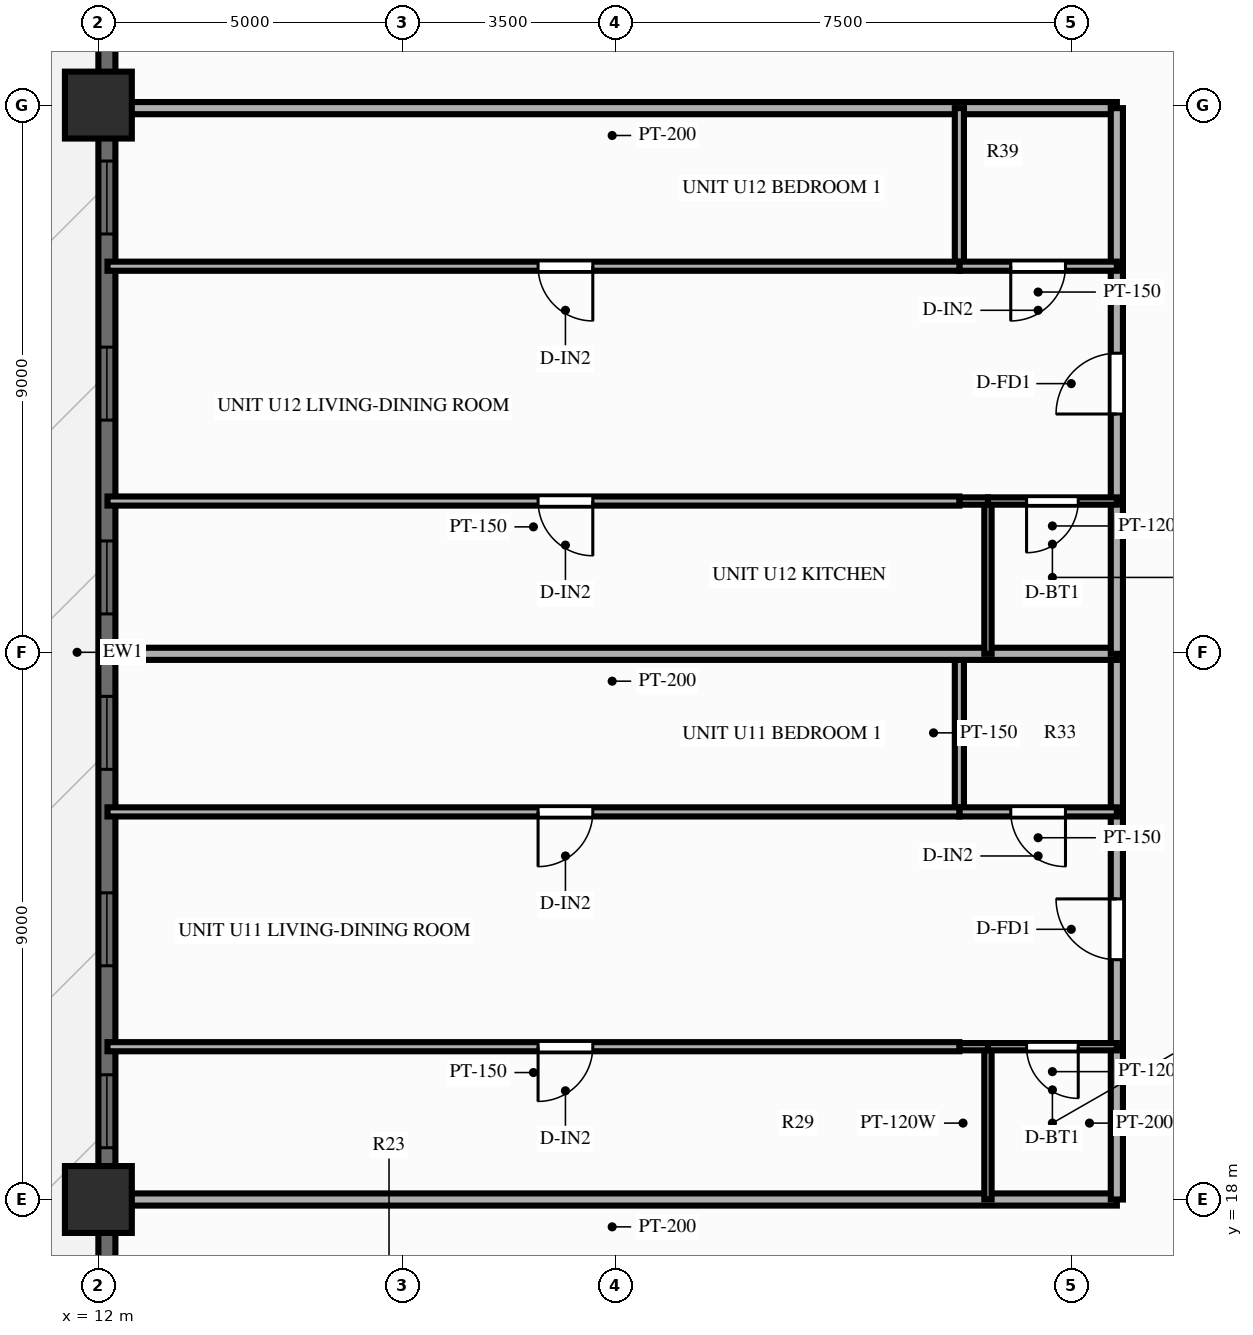
"""IFC4 building model, lengths in metres.
Left out: names, types, materials, properties, quantities, classifications, styles, units other than length and angle.
Written with IfcOpenShell. Run it as: python <this file> out.ifc"""

import sys

from ifc_helpers import new_model, si_unit, direction, frame, frame_2d, origin, origin_2d, place, context, subcontext, project, spatial, rectangle, extrude, source, transform, mapped, element, fill, save


model = new_model("IFC4")
c1 = context("Model", 3, precision=1e-05, world=origin(), true_north=direction((0.0, 1.0)))
c2 = subcontext(c1, "Body", "Model", "MODEL_VIEW")
j1 = project(units=[si_unit("LENGTHUNIT", "METRE"), si_unit("PLANEANGLEUNIT", "RADIAN")], contexts=[c1])
p1 = place(None, origin())
s1 = spatial("IfcSite", under=j1, at=p1, CompositionType="ELEMENT")
p2 = place(p1, origin())
s2 = spatial("IfcBuilding", under=s1, at=p2, CompositionType="ELEMENT")
p3 = place(p2, frame((0.0, 0.0, 22.4)))
s3 = spatial("IfcBuildingStorey", under=s2, at=p3, CompositionType="ELEMENT", Elevation=22.4)
m1 = source(origin(), c2, "Body", "SweptSolid", [
    extrude(rectangle(XDim=1.1, YDim=1.1, at=origin_2d()), origin(), (0.0, 0.0, 1.0), 3.0),
])
for number, where, z_axis, x_axis in (
    (1, (12.0, 36.0, 0.0), (0.0, 0.0, 1.0), (1.0, 0.0, 0.0)),
    (2, (12.0, 18.0, 0.0), (0.0, 0.0, 1.0), (1.0, 0.0, 0.0)),
):
    element("IfcColumn", number, at=place(p3, frame(where, z_axis=z_axis, x_axis=x_axis)), inside=s3, PredefinedType="COLUMN", context=c2, shape_type="MappedRepresentation", body=[
        mapped(m1, transform((0.0, 0.0, 0.0), scale=1.0)),
    ])
p4 = place(p3, frame((12.14, 6.5, 0.0), z_axis=(0.0, 0.0, 1.0), x_axis=(0.0, 1.0, 0.0)))
e3 = element("IfcWall", 3, at=p4, inside=s3, PredefinedType="SOLIDWALL", context=c2, shape_type="SweptSolid", body=[
    extrude(rectangle(XDim=41.0, YDim=0.28, at=frame_2d((20.5, 0.0))), origin(), (0.0, 0.0, 1.0), 2.28),
])
p5 = place(p4, frame((5.15, 0.0, 0.25)))
e4 = element("IfcOpeningElement", 4, at=p5, cuts=e3, PredefinedType="OPENING", context=c2, shape_type="SweptSolid", body=[
    extrude(rectangle(XDim=1.2, YDim=1.5, at=frame_2d((0.6, 0.75))), frame((0.0, 0.152, 0.0), z_axis=(0.0, -1.0, 0.0), x_axis=(1.0, 0.0, 0.0)), (0.0, 0.0, 1.0), 0.304),
])
p6 = place(p4, frame((12.352, 0.0, 0.25)))
e5 = element("IfcOpeningElement", 5, at=p6, cuts=e3, PredefinedType="OPENING", context=c2, shape_type="SweptSolid", body=[
    extrude(rectangle(XDim=1.2, YDim=1.5, at=frame_2d((0.6, 0.75))), frame((0.0, 0.152, 0.0), z_axis=(0.0, -1.0, 0.0), x_axis=(1.0, 0.0, 0.0)), (0.0, 0.0, 1.0), 0.304),
])
p7 = place(p4, frame((15.344, 0.0, 0.25)))
e6 = element("IfcOpeningElement", 6, at=p7, cuts=e3, PredefinedType="OPENING", context=c2, shape_type="SweptSolid", body=[
    extrude(rectangle(XDim=1.2, YDim=1.5, at=frame_2d((0.6, 0.75))), frame((0.0, 0.152, 0.0), z_axis=(0.0, -1.0, 0.0), x_axis=(1.0, 0.0, 0.0)), (0.0, 0.0, 1.0), 0.304),
])
p8 = place(p4, frame((18.575, 0.0, 0.25)))
e7 = element("IfcOpeningElement", 7, at=p8, cuts=e3, PredefinedType="OPENING", context=c2, shape_type="SweptSolid", body=[
    extrude(rectangle(XDim=1.2, YDim=1.5, at=frame_2d((0.6, 0.75))), frame((0.0, 0.152, 0.0), z_axis=(0.0, -1.0, 0.0), x_axis=(1.0, 0.0, 0.0)), (0.0, 0.0, 1.0), 0.304),
])
p9 = place(p4, frame((21.132, 0.0, 0.25)))
e8 = element("IfcOpeningElement", 8, at=p9, cuts=e3, PredefinedType="OPENING", context=c2, shape_type="SweptSolid", body=[
    extrude(rectangle(XDim=1.2, YDim=1.5, at=frame_2d((0.6, 0.75))), frame((0.0, 0.152, 0.0), z_axis=(0.0, -1.0, 0.0), x_axis=(1.0, 0.0, 0.0)), (0.0, 0.0, 1.0), 0.304),
])
p10 = place(p4, frame((24.319, 0.0, 0.25)))
e9 = element("IfcOpeningElement", 9, at=p10, cuts=e3, PredefinedType="OPENING", context=c2, shape_type="SweptSolid", body=[
    extrude(rectangle(XDim=1.2, YDim=1.5, at=frame_2d((0.6, 0.75))), frame((0.0, 0.152, 0.0), z_axis=(0.0, -1.0, 0.0), x_axis=(1.0, 0.0, 0.0)), (0.0, 0.0, 1.0), 0.304),
])
p11 = place(p4, frame((27.38, 0.0, 0.25)))
e10 = element("IfcOpeningElement", 10, at=p11, cuts=e3, PredefinedType="OPENING", context=c2, shape_type="SweptSolid", body=[
    extrude(rectangle(XDim=1.2, YDim=1.5, at=frame_2d((0.6, 0.75))), frame((0.0, 0.152, 0.0), z_axis=(0.0, -1.0, 0.0), x_axis=(1.0, 0.0, 0.0)), (0.0, 0.0, 1.0), 0.304),
])
p12 = place(p4, frame((34.45, 0.0, 0.0)))
e11 = element("IfcOpeningElement", 11, at=p12, cuts=e3, PredefinedType="OPENING", context=c2, shape_type="SweptSolid", body=[
    extrude(rectangle(XDim=1.6, YDim=2.15, at=frame_2d((0.8, 1.075))), frame((0.0, 0.152, 0.0), z_axis=(0.0, -1.0, 0.0), x_axis=(1.0, 0.0, 0.0)), (0.0, 0.0, 1.0), 0.304),
])
for number, where, z_axis, x_axis in (
    (12, (28.75, 18.0, 0.0), (0.0, 0.0, 1.0), (-1.0, 0.0, 0.0)),
    (13, (28.75, 35.95, 0.0), (0.0, 0.0, 1.0), (-1.0, 0.0, 0.0)),
):
    element("IfcWall", number, at=place(p3, frame(where, z_axis=z_axis, x_axis=x_axis)), inside=s3, PredefinedType="PARTITIONING", context=c2, shape_type="SweptSolid", body=[
        extrude(rectangle(XDim=16.6, YDim=0.2, at=frame_2d((8.3, 0.0))), origin(), (0.0, 0.0, 1.0), 2.24),
    ])
p13 = place(p3, frame((28.75, 18.0, 0.0), z_axis=(0.0, 0.0, 1.0), x_axis=(0.0, 1.0, 0.0)))
e14 = element("IfcWall", 14, at=p13, inside=s3, PredefinedType="PARTITIONING", context=c2, shape_type="SweptSolid", body=[
    extrude(rectangle(XDim=2.513, YDim=0.2, at=frame_2d((1.256, 0.0))), origin(), (0.0, 0.0, 1.0), 2.79),
])
p14 = place(p3, frame((28.75, 20.513, 0.0), z_axis=(0.0, 0.0, 1.0), x_axis=(0.0, 1.0, 0.0)))
e15 = element("IfcWall", 15, at=p14, inside=s3, PredefinedType="PARTITIONING", context=c2, shape_type="SweptSolid", body=[
    extrude(rectangle(XDim=3.862, YDim=0.2, at=frame_2d((1.931, 0.0))), origin(), (0.0, 0.0, 1.0), 2.79),
])
p15 = place(p14, frame((1.431, 0.0, 0.0)))
e16 = element("IfcOpeningElement", 16, at=p15, cuts=e15, PredefinedType="OPENING", context=c2, shape_type="SweptSolid", body=[
    extrude(rectangle(XDim=1.0, YDim=2.15, at=frame_2d((0.5, 1.075))), frame((0.0, 0.112, 0.0), z_axis=(0.0, -1.0, 0.0), x_axis=(1.0, 0.0, 0.0)), (0.0, 0.0, 1.0), 0.224),
])
p16 = place(p3, frame((28.75, 24.375, 0.0), z_axis=(0.0, 0.0, 1.0), x_axis=(0.0, 1.0, 0.0)))
e17 = element("IfcWall", 17, at=p16, inside=s3, PredefinedType="PARTITIONING", context=c2, shape_type="SweptSolid", body=[
    extrude(rectangle(XDim=2.6, YDim=0.2, at=frame_2d((1.3, 0.0))), origin(), (0.0, 0.0, 1.0), 2.79),
])
p17 = place(p3, frame((26.63, 18.0, 0.0), z_axis=(0.0, 0.0, 1.0), x_axis=(0.0, 1.0, 0.0)))
e18 = element("IfcWall", 18, at=p17, inside=s3, PredefinedType="PARTITIONING", context=c2, shape_type="SweptSolid", body=[
    extrude(rectangle(XDim=2.513, YDim=0.12, at=frame_2d((1.256, 0.0))), origin(), (0.0, 0.0, 1.0), 2.79),
])
p18 = place(p3, frame((26.16, 24.375, 0.0), z_axis=(0.0, 0.0, 1.0), x_axis=(0.0, 1.0, 0.0)))
e19 = element("IfcWall", 19, at=p18, inside=s3, PredefinedType="PARTITIONING", context=c2, shape_type="SweptSolid", body=[
    extrude(rectangle(XDim=2.6, YDim=0.15, at=frame_2d((1.3, 0.0))), origin(), (0.0, 0.0, 1.0), 2.79),
])
p19 = place(p3, frame((28.75, 20.513, 0.0), z_axis=(0.0, 0.0, 1.0), x_axis=(-1.0, 0.0, 0.0)))
e20 = element("IfcWall", 20, at=p19, inside=s3, PredefinedType="PARTITIONING", context=c2, shape_type="SweptSolid", body=[
    extrude(rectangle(XDim=2.12, YDim=0.12, at=frame_2d((1.06, 0.0))), origin(), (0.0, 0.0, 1.0), 2.79),
])
p20 = place(p19, frame((0.635, 0.0, 0.0)))
e21 = element("IfcOpeningElement", 21, at=p20, cuts=e20, PredefinedType="OPENING", context=c2, shape_type="SweptSolid", body=[
    extrude(rectangle(XDim=0.85, YDim=2.05, at=frame_2d((0.425, 1.025))), frame((0.0, 0.072, 0.0), z_axis=(0.0, -1.0, 0.0), x_axis=(1.0, 0.0, 0.0)), (0.0, 0.0, 1.0), 0.144),
])
p21 = place(p3, frame((26.63, 20.513, 0.0), z_axis=(0.0, 0.0, 1.0), x_axis=(-1.0, 0.0, 0.0)))
e22 = element("IfcWall", 22, at=p21, inside=s3, PredefinedType="PARTITIONING", context=c2, shape_type="SweptSolid", body=[
    extrude(rectangle(XDim=0.47, YDim=0.12, at=frame_2d((0.235, 0.0))), origin(), (0.0, 0.0, 1.0), 2.79),
])
p22 = place(p3, frame((26.16, 20.513, 0.0), z_axis=(0.0, 0.0, 1.0), x_axis=(-1.0, 0.0, 0.0)))
e23 = element("IfcWall", 23, at=p22, inside=s3, PredefinedType="PARTITIONING", context=c2, shape_type="SweptSolid", body=[
    extrude(rectangle(XDim=14.01, YDim=0.15, at=frame_2d((7.005, 0.0))), origin(), (0.0, 0.0, 1.0), 2.79),
])
p23 = place(p22, frame((6.029, 0.0, 0.0)))
e24 = element("IfcOpeningElement", 24, at=p23, cuts=e23, PredefinedType="OPENING", context=c2, shape_type="SweptSolid", body=[
    extrude(rectangle(XDim=0.9, YDim=2.1, at=frame_2d((0.45, 1.05))), frame((0.0, 0.087, 0.0), z_axis=(0.0, -1.0, 0.0), x_axis=(1.0, 0.0, 0.0)), (0.0, 0.0, 1.0), 0.174),
])
p24 = place(p3, frame((28.75, 24.375, 0.0), z_axis=(0.0, 0.0, 1.0), x_axis=(-1.0, 0.0, 0.0)))
e25 = element("IfcWall", 25, at=p24, inside=s3, PredefinedType="PARTITIONING", context=c2, shape_type="SweptSolid", body=[
    extrude(rectangle(XDim=2.59, YDim=0.15, at=frame_2d((1.295, 0.0))), origin(), (0.0, 0.0, 1.0), 2.79),
])
p25 = place(p24, frame((0.845, 0.0, 0.0)))
e26 = element("IfcOpeningElement", 26, at=p25, cuts=e25, PredefinedType="OPENING", context=c2, shape_type="SweptSolid", body=[
    extrude(rectangle(XDim=0.9, YDim=2.1, at=frame_2d((0.45, 1.05))), frame((0.0, 0.087, 0.0), z_axis=(0.0, -1.0, 0.0), x_axis=(1.0, 0.0, 0.0)), (0.0, 0.0, 1.0), 0.174),
])
p26 = place(p3, frame((26.16, 24.375, 0.0), z_axis=(0.0, 0.0, 1.0), x_axis=(-1.0, 0.0, 0.0)))
e27 = element("IfcWall", 27, at=p26, inside=s3, PredefinedType="PARTITIONING", context=c2, shape_type="SweptSolid", body=[
    extrude(rectangle(XDim=14.01, YDim=0.15, at=frame_2d((7.005, 0.0))), origin(), (0.0, 0.0, 1.0), 2.79),
])
p27 = place(p26, frame((6.029, 0.0, 0.0)))
e28 = element("IfcOpeningElement", 28, at=p27, cuts=e27, PredefinedType="OPENING", context=c2, shape_type="SweptSolid", body=[
    extrude(rectangle(XDim=0.9, YDim=2.1, at=frame_2d((0.45, 1.05))), frame((0.0, 0.087, 0.0), z_axis=(0.0, -1.0, 0.0), x_axis=(1.0, 0.0, 0.0)), (0.0, 0.0, 1.0), 0.174),
])
p28 = place(p3, frame((28.75, 26.975, 0.0), z_axis=(0.0, 0.0, 1.0), x_axis=(-1.0, 0.0, 0.0)))
e29 = element("IfcWall", 29, at=p28, inside=s3, PredefinedType="PARTITIONING", context=c2, shape_type="SweptSolid", body=[
    extrude(rectangle(XDim=16.6, YDim=0.2, at=frame_2d((8.3, 0.0))), origin(), (0.0, 0.0, 1.0), 2.79),
])
p29 = place(p3, frame((28.75, 26.975, 0.0), z_axis=(0.0, 0.0, 1.0), x_axis=(0.0, 1.0, 0.0)))
e30 = element("IfcWall", 30, at=p29, inside=s3, PredefinedType="PARTITIONING", context=c2, shape_type="SweptSolid", body=[
    extrude(rectangle(XDim=2.513, YDim=0.2, at=frame_2d((1.256, 0.0))), origin(), (0.0, 0.0, 1.0), 2.79),
])
p30 = place(p3, frame((28.75, 29.488, 0.0), z_axis=(0.0, 0.0, 1.0), x_axis=(0.0, 1.0, 0.0)))
e31 = element("IfcWall", 31, at=p30, inside=s3, PredefinedType="PARTITIONING", context=c2, shape_type="SweptSolid", body=[
    extrude(rectangle(XDim=3.862, YDim=0.2, at=frame_2d((1.931, 0.0))), origin(), (0.0, 0.0, 1.0), 2.79),
])
p31 = place(p30, frame((1.431, 0.0, 0.0)))
e32 = element("IfcOpeningElement", 32, at=p31, cuts=e31, PredefinedType="OPENING", context=c2, shape_type="SweptSolid", body=[
    extrude(rectangle(XDim=1.0, YDim=2.15, at=frame_2d((0.5, 1.075))), frame((0.0, 0.112, 0.0), z_axis=(0.0, -1.0, 0.0), x_axis=(1.0, 0.0, 0.0)), (0.0, 0.0, 1.0), 0.224),
])
p32 = place(p3, frame((28.75, 33.35, 0.0), z_axis=(0.0, 0.0, 1.0), x_axis=(0.0, 1.0, 0.0)))
e33 = element("IfcWall", 33, at=p32, inside=s3, PredefinedType="PARTITIONING", context=c2, shape_type="SweptSolid", body=[
    extrude(rectangle(XDim=2.6, YDim=0.2, at=frame_2d((1.3, 0.0))), origin(), (0.0, 0.0, 1.0), 2.79),
])
p33 = place(p3, frame((26.63, 26.975, 0.0), z_axis=(0.0, 0.0, 1.0), x_axis=(0.0, 1.0, 0.0)))
e34 = element("IfcWall", 34, at=p33, inside=s3, PredefinedType="PARTITIONING", context=c2, shape_type="SweptSolid", body=[
    extrude(rectangle(XDim=2.513, YDim=0.12, at=frame_2d((1.256, 0.0))), origin(), (0.0, 0.0, 1.0), 2.79),
])
p34 = place(p3, frame((26.16, 33.35, 0.0), z_axis=(0.0, 0.0, 1.0), x_axis=(0.0, 1.0, 0.0)))
e35 = element("IfcWall", 35, at=p34, inside=s3, PredefinedType="PARTITIONING", context=c2, shape_type="SweptSolid", body=[
    extrude(rectangle(XDim=2.6, YDim=0.15, at=frame_2d((1.3, 0.0))), origin(), (0.0, 0.0, 1.0), 2.79),
])
p35 = place(p3, frame((28.75, 29.488, 0.0), z_axis=(0.0, 0.0, 1.0), x_axis=(-1.0, 0.0, 0.0)))
e36 = element("IfcWall", 36, at=p35, inside=s3, PredefinedType="PARTITIONING", context=c2, shape_type="SweptSolid", body=[
    extrude(rectangle(XDim=2.12, YDim=0.12, at=frame_2d((1.06, 0.0))), origin(), (0.0, 0.0, 1.0), 2.79),
])
p36 = place(p35, frame((0.635, 0.0, 0.0)))
e37 = element("IfcOpeningElement", 37, at=p36, cuts=e36, PredefinedType="OPENING", context=c2, shape_type="SweptSolid", body=[
    extrude(rectangle(XDim=0.85, YDim=2.05, at=frame_2d((0.425, 1.025))), frame((0.0, 0.072, 0.0), z_axis=(0.0, -1.0, 0.0), x_axis=(1.0, 0.0, 0.0)), (0.0, 0.0, 1.0), 0.144),
])
p37 = place(p3, frame((26.63, 29.488, 0.0), z_axis=(0.0, 0.0, 1.0), x_axis=(-1.0, 0.0, 0.0)))
e38 = element("IfcWall", 38, at=p37, inside=s3, PredefinedType="PARTITIONING", context=c2, shape_type="SweptSolid", body=[
    extrude(rectangle(XDim=0.47, YDim=0.12, at=frame_2d((0.235, 0.0))), origin(), (0.0, 0.0, 1.0), 2.79),
])
p38 = place(p3, frame((26.16, 29.488, 0.0), z_axis=(0.0, 0.0, 1.0), x_axis=(-1.0, 0.0, 0.0)))
e39 = element("IfcWall", 39, at=p38, inside=s3, PredefinedType="PARTITIONING", context=c2, shape_type="SweptSolid", body=[
    extrude(rectangle(XDim=14.01, YDim=0.15, at=frame_2d((7.005, 0.0))), origin(), (0.0, 0.0, 1.0), 2.79),
])
p39 = place(p38, frame((6.029, 0.0, 0.0)))
e40 = element("IfcOpeningElement", 40, at=p39, cuts=e39, PredefinedType="OPENING", context=c2, shape_type="SweptSolid", body=[
    extrude(rectangle(XDim=0.9, YDim=2.1, at=frame_2d((0.45, 1.05))), frame((0.0, 0.087, 0.0), z_axis=(0.0, -1.0, 0.0), x_axis=(1.0, 0.0, 0.0)), (0.0, 0.0, 1.0), 0.174),
])
p40 = place(p3, frame((28.75, 33.35, 0.0), z_axis=(0.0, 0.0, 1.0), x_axis=(-1.0, 0.0, 0.0)))
e41 = element("IfcWall", 41, at=p40, inside=s3, PredefinedType="PARTITIONING", context=c2, shape_type="SweptSolid", body=[
    extrude(rectangle(XDim=2.59, YDim=0.15, at=frame_2d((1.295, 0.0))), origin(), (0.0, 0.0, 1.0), 2.79),
])
p41 = place(p40, frame((0.845, 0.0, 0.0)))
e42 = element("IfcOpeningElement", 42, at=p41, cuts=e41, PredefinedType="OPENING", context=c2, shape_type="SweptSolid", body=[
    extrude(rectangle(XDim=0.9, YDim=2.1, at=frame_2d((0.45, 1.05))), frame((0.0, 0.087, 0.0), z_axis=(0.0, -1.0, 0.0), x_axis=(1.0, 0.0, 0.0)), (0.0, 0.0, 1.0), 0.174),
])
p42 = place(p3, frame((26.16, 33.35, 0.0), z_axis=(0.0, 0.0, 1.0), x_axis=(-1.0, 0.0, 0.0)))
e43 = element("IfcWall", 43, at=p42, inside=s3, PredefinedType="PARTITIONING", context=c2, shape_type="SweptSolid", body=[
    extrude(rectangle(XDim=14.01, YDim=0.15, at=frame_2d((7.005, 0.0))), origin(), (0.0, 0.0, 1.0), 2.79),
])
p43 = place(p42, frame((6.029, 0.0, 0.0)))
e44 = element("IfcOpeningElement", 44, at=p43, cuts=e43, PredefinedType="OPENING", context=c2, shape_type="SweptSolid", body=[
    extrude(rectangle(XDim=0.9, YDim=2.1, at=frame_2d((0.45, 1.05))), frame((0.0, 0.087, 0.0), z_axis=(0.0, -1.0, 0.0), x_axis=(1.0, 0.0, 0.0)), (0.0, 0.0, 1.0), 0.174),
])
m2 = source(origin(), c2, "Body", "SweptSolid", [
    extrude(rectangle(XDim=1.2, YDim=1.5, at=frame_2d((0.6, 0.75))), frame((0.0, 0.03, 0.0), z_axis=(0.0, -1.0, 0.0), x_axis=(1.0, 0.0, 0.0)), (0.0, 0.0, 1.0), 0.06),
])
p44 = place(p6, origin())
e45 = element("IfcWindow", 45, at=p44, inside=s3, PartitioningType="SINGLE_PANEL", PredefinedType="WINDOW", context=c2, shape_type="MappedRepresentation", body=[
    mapped(m2, transform((0.0, 0.0, 0.0), scale=1.0)),
])
fill(e5, e45)
p45 = place(p7, origin())
e46 = element("IfcWindow", 46, at=p45, inside=s3, PartitioningType="SINGLE_PANEL", PredefinedType="WINDOW", context=c2, shape_type="MappedRepresentation", body=[
    mapped(m2, transform((0.0, 0.0, 0.0), scale=1.0)),
])
fill(e6, e46)
p46 = place(p8, origin())
e47 = element("IfcWindow", 47, at=p46, inside=s3, PartitioningType="SINGLE_PANEL", PredefinedType="WINDOW", context=c2, shape_type="MappedRepresentation", body=[
    mapped(m2, transform((0.0, 0.0, 0.0), scale=1.0)),
])
fill(e7, e47)
p47 = place(p9, origin())
e48 = element("IfcWindow", 48, at=p47, inside=s3, PartitioningType="SINGLE_PANEL", PredefinedType="WINDOW", context=c2, shape_type="MappedRepresentation", body=[
    mapped(m2, transform((0.0, 0.0, 0.0), scale=1.0)),
])
fill(e8, e48)
p48 = place(p10, origin())
e49 = element("IfcWindow", 49, at=p48, inside=s3, PartitioningType="SINGLE_PANEL", PredefinedType="WINDOW", context=c2, shape_type="MappedRepresentation", body=[
    mapped(m2, transform((0.0, 0.0, 0.0), scale=1.0)),
])
fill(e9, e49)
p49 = place(p11, origin())
e50 = element("IfcWindow", 50, at=p49, inside=s3, PartitioningType="SINGLE_PANEL", PredefinedType="WINDOW", context=c2, shape_type="MappedRepresentation", body=[
    mapped(m2, transform((0.0, 0.0, 0.0), scale=1.0)),
])
fill(e10, e50)
m3 = source(origin(), c2, "Body", "SweptSolid", [
    extrude(rectangle(XDim=1.0, YDim=2.15, at=frame_2d((0.5, 1.075))), frame((0.0, 0.025, 0.0), z_axis=(0.0, -1.0, 0.0), x_axis=(1.0, 0.0, 0.0)), (0.0, 0.0, 1.0), 0.05),
])
p50 = place(p15, origin())
e51 = element("IfcDoor", 51, at=p50, inside=s3, OperationType="SINGLE_SWING_RIGHT", PredefinedType="DOOR", context=c2, shape_type="MappedRepresentation", body=[
    mapped(m3, transform((0.0, 0.0, 0.0), scale=1.0)),
])
fill(e16, e51)
m4 = source(origin(), c2, "Body", "SweptSolid", [
    extrude(rectangle(XDim=0.85, YDim=2.05, at=frame_2d((0.425, 1.025))), frame((0.0, 0.025, 0.0), z_axis=(0.0, -1.0, 0.0), x_axis=(1.0, 0.0, 0.0)), (0.0, 0.0, 1.0), 0.05),
])
p51 = place(p20, origin())
e52 = element("IfcDoor", 52, at=p51, inside=s3, OperationType="SINGLE_SWING_LEFT", PredefinedType="DOOR", context=c2, shape_type="MappedRepresentation", body=[
    mapped(m4, transform((0.0, 0.0, 0.0), scale=1.0)),
])
fill(e21, e52)
m5 = source(origin(), c2, "Body", "SweptSolid", [
    extrude(rectangle(XDim=0.9, YDim=2.1, at=frame_2d((0.45, 1.05))), frame((0.0, 0.025, 0.0), z_axis=(0.0, -1.0, 0.0), x_axis=(1.0, 0.0, 0.0)), (0.0, 0.0, 1.0), 0.05),
])
p52 = place(p23, origin())
e53 = element("IfcDoor", 53, at=p52, inside=s3, OperationType="SINGLE_SWING_RIGHT", PredefinedType="DOOR", context=c2, shape_type="MappedRepresentation", body=[
    mapped(m5, transform((0.0, 0.0, 0.0), scale=1.0)),
])
fill(e24, e53)
p53 = place(p25, origin())
e54 = element("IfcDoor", 54, at=p53, inside=s3, OperationType="SINGLE_SWING_LEFT", PredefinedType="DOOR", context=c2, shape_type="MappedRepresentation", body=[
    mapped(m5, transform((0.0, 0.0, 0.0), scale=1.0)),
])
fill(e26, e54)
p54 = place(p27, origin())
e55 = element("IfcDoor", 55, at=p54, inside=s3, OperationType="SINGLE_SWING_RIGHT", PredefinedType="DOOR", context=c2, shape_type="MappedRepresentation", body=[
    mapped(m5, transform((0.0, 0.0, 0.0), scale=1.0)),
])
fill(e28, e55)
p55 = place(p31, origin())
e56 = element("IfcDoor", 56, at=p55, inside=s3, OperationType="SINGLE_SWING_LEFT", PredefinedType="DOOR", context=c2, shape_type="MappedRepresentation", body=[
    mapped(m3, transform((0.0, 0.0, 0.0), scale=1.0)),
])
fill(e32, e56)
p56 = place(p36, origin())
e57 = element("IfcDoor", 57, at=p56, inside=s3, OperationType="SINGLE_SWING_RIGHT", PredefinedType="DOOR", context=c2, shape_type="MappedRepresentation", body=[
    mapped(m4, transform((0.0, 0.0, 0.0), scale=1.0)),
])
fill(e37, e57)
p57 = place(p39, origin())
e58 = element("IfcDoor", 58, at=p57, inside=s3, OperationType="SINGLE_SWING_LEFT", PredefinedType="DOOR", context=c2, shape_type="MappedRepresentation", body=[
    mapped(m5, transform((0.0, 0.0, 0.0), scale=1.0)),
])
fill(e40, e58)
p58 = place(p41, origin())
e59 = element("IfcDoor", 59, at=p58, inside=s3, OperationType="SINGLE_SWING_RIGHT", PredefinedType="DOOR", context=c2, shape_type="MappedRepresentation", body=[
    mapped(m5, transform((0.0, 0.0, 0.0), scale=1.0)),
])
fill(e42, e59)
p59 = place(p43, origin())
e60 = element("IfcDoor", 60, at=p59, inside=s3, OperationType="SINGLE_SWING_LEFT", PredefinedType="DOOR", context=c2, shape_type="MappedRepresentation", body=[
    mapped(m5, transform((0.0, 0.0, 0.0), scale=1.0)),
])
fill(e44, e60)
save(model, sys.argv[1])
